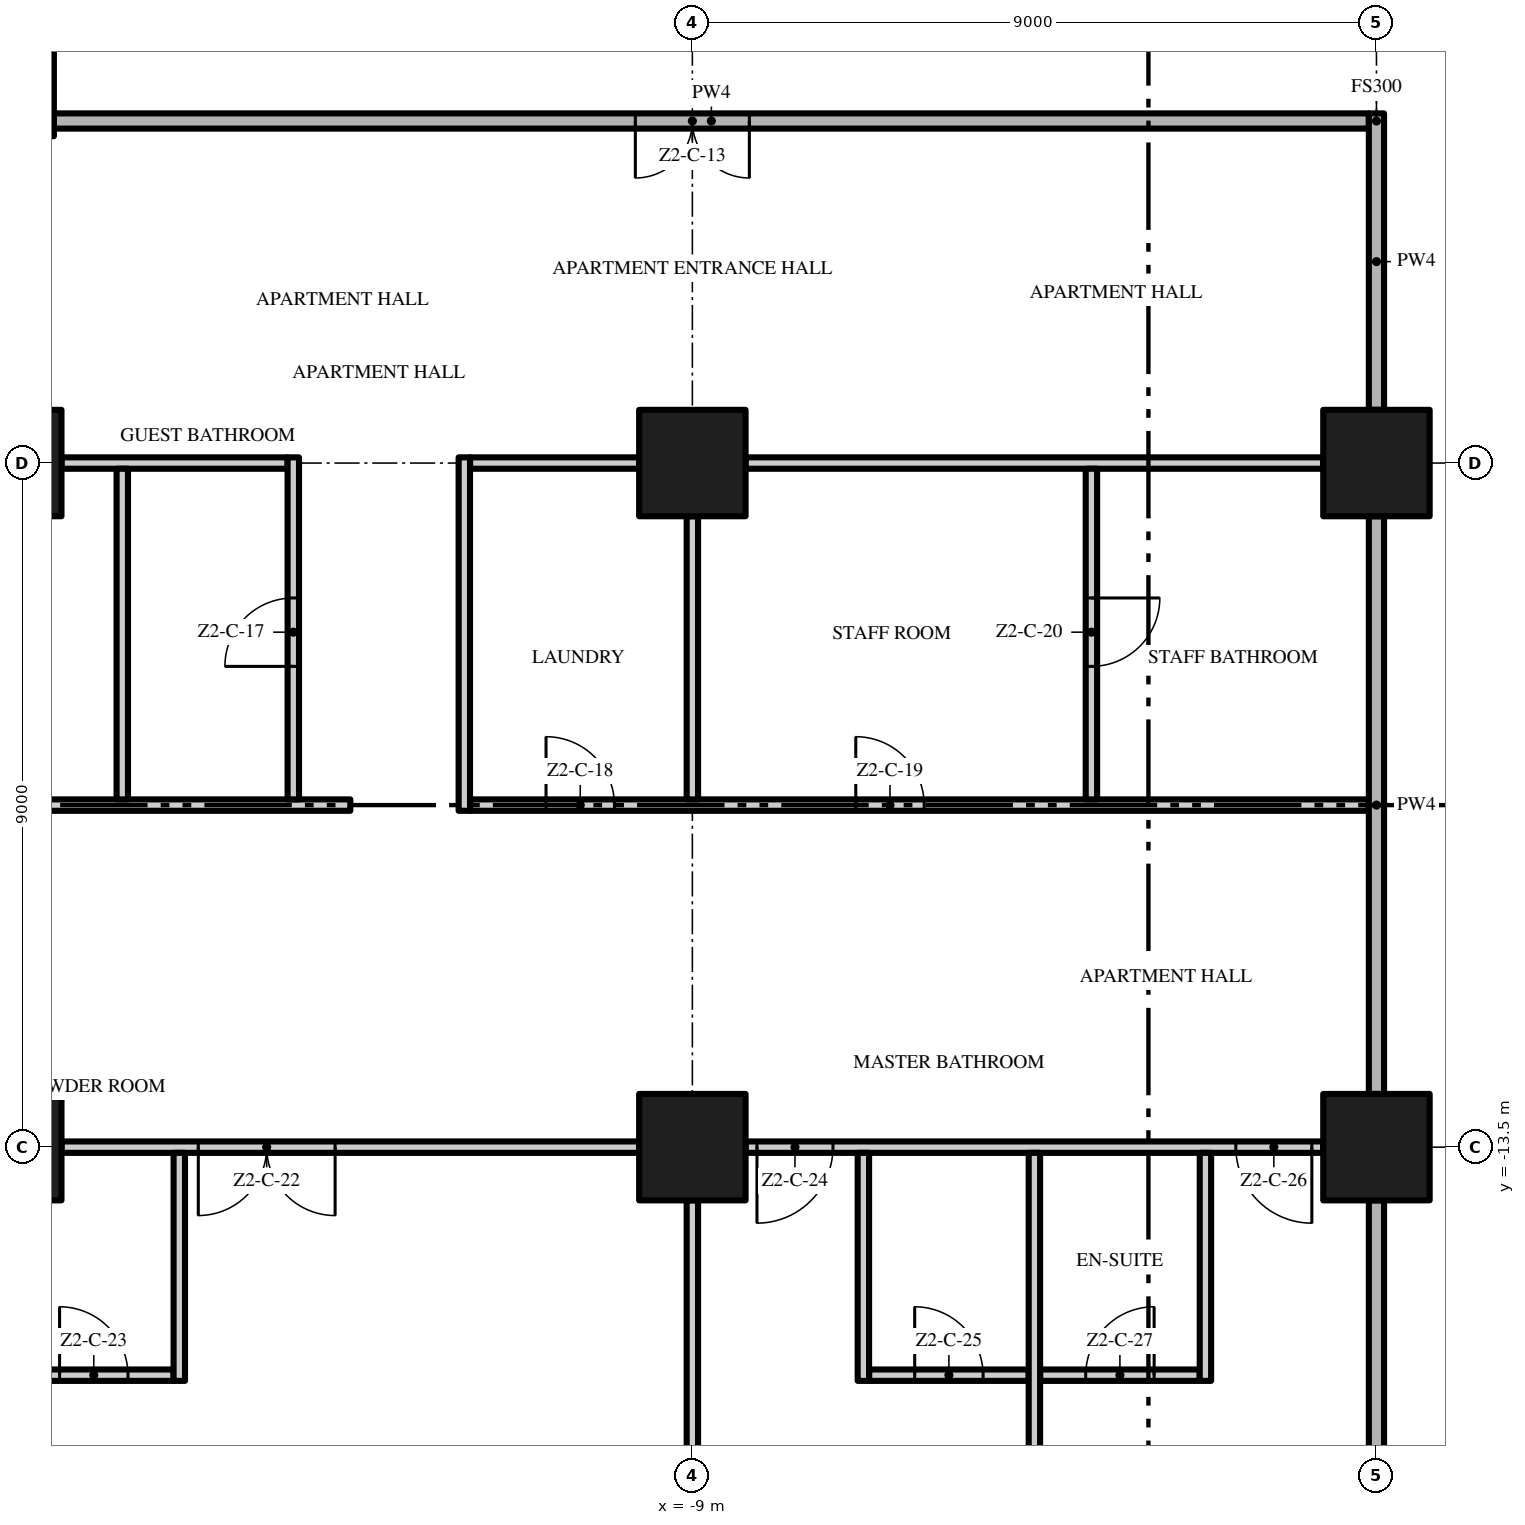
"""IFC4 building model, lengths in metres.
Left out: names, types, materials, properties, quantities, classifications, styles, units other than length and angle.
Written with IfcOpenShell. Run it as: python <this file> out.ifc"""

import sys

from ifc_helpers import new_model, si_unit, direction, frame, frame_2d, origin, origin_2d, place, context, subcontext, project, spatial, rectangle, extrude, element, fill, save


model = new_model("IFC4")
c1 = context("Model", 3, precision=1e-05, world=origin(), true_north=direction((0.0, 1.0)))
c2 = subcontext(c1, "Body", "Model", "MODEL_VIEW")
j1 = project(units=[si_unit("LENGTHUNIT", "METRE"), si_unit("PLANEANGLEUNIT", "RADIAN")], contexts=[c1])
p1 = place(None, origin())
s1 = spatial("IfcSite", under=j1, at=p1, CompositionType="ELEMENT")
p2 = place(p1, origin())
s2 = spatial("IfcBuilding", under=s1, at=p2, CompositionType="ELEMENT")
p3 = place(p2, frame((0.0, 0.0, 92.2)))
s3 = spatial("IfcBuildingStorey", under=s2, at=p3, CompositionType="ELEMENT", Elevation=92.2)
for number, where, z_axis, x_axis in (
    (1, (-18.0, -13.5, 0.0), (0.0, 0.0, 1.0), (1.0, 0.0, 0.0)),
    (2, (-18.0, -4.5, 0.0), (0.0, 0.0, 1.0), (1.0, 0.0, 0.0)),
    (3, (-9.0, -13.5, 0.0), (0.0, 0.0, 1.0), (1.0, 0.0, 0.0)),
    (4, (-9.0, -4.5, 0.0), (0.0, 0.0, 1.0), (1.0, 0.0, 0.0)),
    (5, (0.0, -13.5, 0.0), (0.0, 0.0, 1.0), (1.0, 0.0, 0.0)),
    (6, (0.0, -4.5, 0.0), (0.0, 0.0, 1.0), (1.0, 0.0, 0.0)),
):
    element("IfcColumn", number, at=place(p3, frame(where, z_axis=z_axis, x_axis=x_axis)), inside=s3, PredefinedType="COLUMN", context=c2, shape_type="SweptSolid", body=[
        extrude(rectangle(XDim=1.4, YDim=1.4, at=origin_2d()), origin(), (0.0, 0.0, 1.0), 3.5),
    ])
p4 = place(p3, frame((-17.925, -16.5, 0.0), z_axis=(0.0, 0.0, 1.0), x_axis=(1.0, 0.0, 0.0)))
e7 = element("IfcWall", 7, at=p4, inside=s3, PredefinedType="PARTITIONING", context=c2, shape_type="SweptSolid", body=[
    extrude(rectangle(XDim=2.1, YDim=0.15, at=frame_2d((1.05, 0.0))), origin(), (0.0, 0.0, 1.0), 3.5),
])
p5 = place(p4, frame((0.6, 0.0, 0.0)))
e8 = element("IfcOpeningElement", 8, at=p5, cuts=e7, PredefinedType="OPENING", context=c2, shape_type="SweptSolid", body=[
    extrude(rectangle(XDim=0.9, YDim=2.1, at=frame_2d((0.45, 1.05))), frame((0.0, 0.085, 0.0), z_axis=(0.0, -1.0, 0.0), x_axis=(1.0, 0.0, 0.0)), (0.0, 0.0, 1.0), 0.17),
])
p6 = place(p3, frame((-6.675, -16.5, 0.0), z_axis=(0.0, 0.0, 1.0), x_axis=(1.0, 0.0, 0.0)))
e9 = element("IfcWall", 9, at=p6, inside=s3, PredefinedType="PARTITIONING", context=c2, shape_type="SweptSolid", body=[
    extrude(rectangle(XDim=2.1, YDim=0.15, at=frame_2d((1.05, 0.0))), origin(), (0.0, 0.0, 1.0), 3.5),
])
p7 = place(p6, frame((0.6, 0.0, 0.0)))
e10 = element("IfcOpeningElement", 10, at=p7, cuts=e9, PredefinedType="OPENING", context=c2, shape_type="SweptSolid", body=[
    extrude(rectangle(XDim=0.9, YDim=2.1, at=frame_2d((0.45, 1.05))), frame((0.0, 0.085, 0.0), z_axis=(0.0, -1.0, 0.0), x_axis=(1.0, 0.0, 0.0)), (0.0, 0.0, 1.0), 0.17),
])
p8 = place(p3, frame((-4.425, -16.5, 0.0), z_axis=(0.0, 0.0, 1.0), x_axis=(1.0, 0.0, 0.0)))
e11 = element("IfcWall", 11, at=p8, inside=s3, PredefinedType="PARTITIONING", context=c2, shape_type="SweptSolid", body=[
    extrude(rectangle(XDim=2.1, YDim=0.15, at=frame_2d((1.05, 0.0))), origin(), (0.0, 0.0, 1.0), 3.5),
])
p9 = place(p8, frame((0.6, 0.0, 0.0)))
e12 = element("IfcOpeningElement", 12, at=p9, cuts=e11, PredefinedType="OPENING", context=c2, shape_type="SweptSolid", body=[
    extrude(rectangle(XDim=0.9, YDim=2.1, at=frame_2d((0.45, 1.05))), frame((0.0, 0.085, 0.0), z_axis=(0.0, -1.0, 0.0), x_axis=(1.0, 0.0, 0.0)), (0.0, 0.0, 1.0), 0.17),
])
p10 = place(p3, frame((-9.7, -13.5, 0.0), z_axis=(0.0, 0.0, 1.0), x_axis=(-1.0, 0.0, 0.0)))
e13 = element("IfcWall", 13, at=p10, inside=s3, PredefinedType="PARTITIONING", context=c2, shape_type="SweptSolid", body=[
    extrude(rectangle(XDim=7.6, YDim=0.15, at=frame_2d((3.8, 0.0))), origin(), (0.0, 0.0, 1.0), 3.5),
])
p11 = place(p10, frame((4.0, 0.0, 0.0)))
e14 = element("IfcOpeningElement", 14, at=p11, cuts=e13, PredefinedType="OPENING", context=c2, shape_type="SweptSolid", body=[
    extrude(rectangle(XDim=1.8, YDim=2.4, at=frame_2d((0.9, 1.2))), frame((0.0, 0.085, 0.0), z_axis=(0.0, -1.0, 0.0), x_axis=(1.0, 0.0, 0.0)), (0.0, 0.0, 1.0), 0.17),
])
p12 = place(p3, frame((-0.7, -13.5, 0.0), z_axis=(0.0, 0.0, 1.0), x_axis=(-1.0, 0.0, 0.0)))
e15 = element("IfcWall", 15, at=p12, inside=s3, PredefinedType="PARTITIONING", context=c2, shape_type="SweptSolid", body=[
    extrude(rectangle(XDim=7.6, YDim=0.15, at=frame_2d((3.8, 0.0))), origin(), (0.0, 0.0, 1.0), 3.5),
])
p13 = place(p12, frame((6.45, 0.0, 0.0)))
e16 = element("IfcOpeningElement", 16, at=p13, cuts=e15, PredefinedType="OPENING", context=c2, shape_type="SweptSolid", body=[
    extrude(rectangle(XDim=1.0, YDim=2.4, at=frame_2d((0.5, 1.2))), frame((0.0, 0.085, 0.0), z_axis=(0.0, -1.0, 0.0), x_axis=(1.0, 0.0, 0.0)), (0.0, 0.0, 1.0), 0.17),
])
p14 = place(p12, frame((0.15, 0.0, 0.0)))
e17 = element("IfcOpeningElement", 17, at=p14, cuts=e15, PredefinedType="OPENING", context=c2, shape_type="SweptSolid", body=[
    extrude(rectangle(XDim=1.0, YDim=2.4, at=frame_2d((0.5, 1.2))), frame((0.0, 0.085, 0.0), z_axis=(0.0, -1.0, 0.0), x_axis=(1.0, 0.0, 0.0)), (0.0, 0.0, 1.0), 0.17),
])
p15 = place(p3, frame((-26.7, -9.0, 0.0), z_axis=(0.0, 0.0, 1.0), x_axis=(1.0, 0.0, 0.0)))
e18 = element("IfcWall", 18, at=p15, inside=s3, PredefinedType="PARTITIONING", context=c2, shape_type="SweptSolid", body=[
    extrude(rectangle(XDim=13.2, YDim=0.15, at=frame_2d((6.6, 0.0))), origin(), (0.0, 0.0, 1.0), 3.5),
])
p16 = place(p15, frame((0.2, 0.0, 0.0)))
e19 = element("IfcOpeningElement", 19, at=p16, cuts=e18, PredefinedType="OPENING", context=c2, shape_type="SweptSolid", body=[
    extrude(rectangle(XDim=0.8, YDim=2.0, at=frame_2d((0.4, 1.0))), frame((0.0, 0.085, 0.0), z_axis=(0.0, -1.0, 0.0), x_axis=(1.0, 0.0, 0.0)), (0.0, 0.0, 1.0), 0.17),
])
p17 = place(p3, frame((-11.925, -9.0, 0.0), z_axis=(0.0, 0.0, 1.0), x_axis=(1.0, 0.0, 0.0)))
e20 = element("IfcWall", 20, at=p17, inside=s3, PredefinedType="PARTITIONING", context=c2, shape_type="SweptSolid", body=[
    extrude(rectangle(XDim=11.825, YDim=0.15, at=frame_2d((5.912, 0.0))), origin(), (0.0, 0.0, 1.0), 3.5),
])
p18 = place(p17, frame((1.0, 0.0, 0.0)))
e21 = element("IfcOpeningElement", 21, at=p18, cuts=e20, PredefinedType="OPENING", context=c2, shape_type="SweptSolid", body=[
    extrude(rectangle(XDim=0.9, YDim=2.1, at=frame_2d((0.45, 1.05))), frame((0.0, 0.085, 0.0), z_axis=(0.0, -1.0, 0.0), x_axis=(1.0, 0.0, 0.0)), (0.0, 0.0, 1.0), 0.17),
])
p19 = place(p17, frame((5.075, 0.0, 0.0)))
e22 = element("IfcOpeningElement", 22, at=p19, cuts=e20, PredefinedType="OPENING", context=c2, shape_type="SweptSolid", body=[
    extrude(rectangle(XDim=0.9, YDim=2.1, at=frame_2d((0.45, 1.05))), frame((0.0, 0.085, 0.0), z_axis=(0.0, -1.0, 0.0), x_axis=(1.0, 0.0, 0.0)), (0.0, 0.0, 1.0), 0.17),
])
p20 = place(p3, frame((-17.3, -4.5, 0.0), z_axis=(0.0, 0.0, 1.0), x_axis=(1.0, 0.0, 0.0)))
e23 = element("IfcWall", 23, at=p20, inside=s3, PredefinedType="PARTITIONING", context=c2, shape_type="SweptSolid", body=[
    extrude(rectangle(XDim=2.975, YDim=0.15, at=frame_2d((1.488, 0.0))), origin(), (0.0, 0.0, 1.0), 3.5),
])
p21 = place(p3, frame((-11.925, -4.5, 0.0), z_axis=(0.0, 0.0, 1.0), x_axis=(1.0, 0.0, 0.0)))
e24 = element("IfcWall", 24, at=p21, inside=s3, PredefinedType="PARTITIONING", context=c2, shape_type="SweptSolid", body=[
    extrude(rectangle(XDim=2.225, YDim=0.15, at=frame_2d((1.113, 0.0))), origin(), (0.0, 0.0, 1.0), 3.5),
])
p22 = place(p3, frame((-8.3, -4.5, 0.0), z_axis=(0.0, 0.0, 1.0), x_axis=(1.0, 0.0, 0.0)))
e25 = element("IfcWall", 25, at=p22, inside=s3, PredefinedType="PARTITIONING", context=c2, shape_type="SweptSolid", body=[
    extrude(rectangle(XDim=7.6, YDim=0.15, at=frame_2d((3.8, 0.0))), origin(), (0.0, 0.0, 1.0), 3.5),
])
p23 = place(p3, frame((-0.1, 0.0, 0.0), z_axis=(0.0, 0.0, 1.0), x_axis=(-1.0, 0.0, 0.0)))
e26 = element("IfcWall", 26, at=p23, inside=s3, PredefinedType="PARTITIONING", context=c2, shape_type="SweptSolid", body=[
    extrude(rectangle(XDim=17.3, YDim=0.2, at=frame_2d((8.65, 0.0))), origin(), (0.0, 0.0, 1.0), 3.5),
])
p24 = place(p23, frame((8.15, 0.0, 0.0)))
e27 = element("IfcOpeningElement", 27, at=p24, cuts=e26, PredefinedType="OPENING", context=c2, shape_type="SweptSolid", body=[
    extrude(rectangle(XDim=1.5, YDim=2.4, at=frame_2d((0.75, 1.2))), frame((0.0, 0.11, 0.0), z_axis=(0.0, -1.0, 0.0), x_axis=(1.0, 0.0, 0.0)), (0.0, 0.0, 1.0), 0.22),
])
p25 = place(p3, frame((-17.5, -0.2, 0.0), z_axis=(0.0, 0.0, 1.0), x_axis=(0.0, 1.0, 0.0)))
e28 = element("IfcWall", 28, at=p25, inside=s3, PredefinedType="PARTITIONING", context=c2, shape_type="SweptSolid", body=[
    extrude(rectangle(XDim=4.0, YDim=0.2, at=frame_2d((2.0, 0.0))), origin(), (0.0, 0.0, 1.0), 3.5),
])
p26 = place(p3, frame((-16.5, -8.925, 0.0), z_axis=(0.0, 0.0, 1.0), x_axis=(0.0, 1.0, 0.0)))
e29 = element("IfcWall", 29, at=p26, inside=s3, PredefinedType="PARTITIONING", context=c2, shape_type="SweptSolid", body=[
    extrude(rectangle(XDim=4.35, YDim=0.15, at=frame_2d((2.175, 0.0))), origin(), (0.0, 0.0, 1.0), 3.5),
])
p27 = place(p3, frame((-15.75, -16.575, 0.0), z_axis=(0.0, 0.0, 1.0), x_axis=(0.0, 1.0, 0.0)))
e30 = element("IfcWall", 30, at=p27, inside=s3, PredefinedType="PARTITIONING", context=c2, shape_type="SweptSolid", body=[
    extrude(rectangle(XDim=3.0, YDim=0.15, at=frame_2d((1.5, 0.0))), origin(), (0.0, 0.0, 1.0), 3.5),
])
p28 = place(p3, frame((-14.25, -8.925, 0.0), z_axis=(0.0, 0.0, 1.0), x_axis=(0.0, 1.0, 0.0)))
e31 = element("IfcWall", 31, at=p28, inside=s3, PredefinedType="PARTITIONING", context=c2, shape_type="SweptSolid", body=[
    extrude(rectangle(XDim=4.5, YDim=0.15, at=frame_2d((2.25, 0.0))), origin(), (0.0, 0.0, 1.0), 3.5),
])
p29 = place(p28, frame((1.75, 0.0, 0.0)))
e32 = element("IfcOpeningElement", 32, at=p29, cuts=e31, PredefinedType="OPENING", context=c2, shape_type="SweptSolid", body=[
    extrude(rectangle(XDim=0.9, YDim=2.1, at=frame_2d((0.45, 1.05))), frame((0.0, 0.085, 0.0), z_axis=(0.0, -1.0, 0.0), x_axis=(1.0, 0.0, 0.0)), (0.0, 0.0, 1.0), 0.17),
])
p30 = place(p3, frame((-12.0, -9.075, 0.0), z_axis=(0.0, 0.0, 1.0), x_axis=(0.0, 1.0, 0.0)))
e33 = element("IfcWall", 33, at=p30, inside=s3, PredefinedType="PARTITIONING", context=c2, shape_type="SweptSolid", body=[
    extrude(rectangle(XDim=4.65, YDim=0.15, at=frame_2d((2.325, 0.0))), origin(), (0.0, 0.0, 1.0), 3.5),
])
p31 = place(p3, frame((-9.0, -21.2, 0.0), z_axis=(0.0, 0.0, 1.0), x_axis=(0.0, 1.0, 0.0)))
e34 = element("IfcWall", 34, at=p31, inside=s3, PredefinedType="PARTITIONING", context=c2, shape_type="SweptSolid", body=[
    extrude(rectangle(XDim=7.0, YDim=0.15, at=frame_2d((3.5, 0.0))), origin(), (0.0, 0.0, 1.0), 3.5),
])
p32 = place(p3, frame((-9.0, -8.925, 0.0), z_axis=(0.0, 0.0, 1.0), x_axis=(0.0, 1.0, 0.0)))
e35 = element("IfcWall", 35, at=p32, inside=s3, PredefinedType="PARTITIONING", context=c2, shape_type="SweptSolid", body=[
    extrude(rectangle(XDim=3.725, YDim=0.15, at=frame_2d((1.863, 0.0))), origin(), (0.0, 0.0, 1.0), 3.5),
])
p33 = place(p3, frame((-6.75, -16.575, 0.0), z_axis=(0.0, 0.0, 1.0), x_axis=(0.0, 1.0, 0.0)))
e36 = element("IfcWall", 36, at=p33, inside=s3, PredefinedType="PARTITIONING", context=c2, shape_type="SweptSolid", body=[
    extrude(rectangle(XDim=3.0, YDim=0.15, at=frame_2d((1.5, 0.0))), origin(), (0.0, 0.0, 1.0), 3.5),
])
p34 = place(p3, frame((-4.5, -22.2, 0.0), z_axis=(0.0, 0.0, 1.0), x_axis=(0.0, 1.0, 0.0)))
e37 = element("IfcWall", 37, at=p34, inside=s3, PredefinedType="PARTITIONING", context=c2, shape_type="SweptSolid", body=[
    extrude(rectangle(XDim=8.625, YDim=0.15, at=frame_2d((4.312, 0.0))), origin(), (0.0, 0.0, 1.0), 3.5),
])
p35 = place(p3, frame((-3.75, -4.575, 0.0), z_axis=(0.0, 0.0, 1.0), x_axis=(0.0, -1.0, 0.0)))
e38 = element("IfcWall", 38, at=p35, inside=s3, PredefinedType="PARTITIONING", context=c2, shape_type="SweptSolid", body=[
    extrude(rectangle(XDim=4.35, YDim=0.15, at=frame_2d((2.175, 0.0))), origin(), (0.0, 0.0, 1.0), 3.5),
])
p36 = place(p35, frame((1.7, 0.0, 0.0)))
e39 = element("IfcOpeningElement", 39, at=p36, cuts=e38, PredefinedType="OPENING", context=c2, shape_type="SweptSolid", body=[
    extrude(rectangle(XDim=0.9, YDim=2.1, at=frame_2d((0.45, 1.05))), frame((0.0, 0.085, 0.0), z_axis=(0.0, -1.0, 0.0), x_axis=(1.0, 0.0, 0.0)), (0.0, 0.0, 1.0), 0.17),
])
p37 = place(p3, frame((-2.25, -16.575, 0.0), z_axis=(0.0, 0.0, 1.0), x_axis=(0.0, 1.0, 0.0)))
e40 = element("IfcWall", 40, at=p37, inside=s3, PredefinedType="PARTITIONING", context=c2, shape_type="SweptSolid", body=[
    extrude(rectangle(XDim=3.0, YDim=0.15, at=frame_2d((1.5, 0.0))), origin(), (0.0, 0.0, 1.0), 3.5),
])
p38 = place(p3, frame((0.0, -21.2, 0.0), z_axis=(0.0, 0.0, 1.0), x_axis=(0.0, 1.0, 0.0)))
e41 = element("IfcWall", 41, at=p38, inside=s3, PredefinedType="PARTITIONING", context=c2, shape_type="SweptSolid", body=[
    extrude(rectangle(XDim=7.0, YDim=0.2, at=frame_2d((3.5, 0.0))), origin(), (0.0, 0.0, 1.0), 3.5),
])
p39 = place(p3, frame((0.0, -12.8, 0.0), z_axis=(0.0, 0.0, 1.0), x_axis=(0.0, 1.0, 0.0)))
e42 = element("IfcWall", 42, at=p39, inside=s3, PredefinedType="PARTITIONING", context=c2, shape_type="SweptSolid", body=[
    extrude(rectangle(XDim=7.6, YDim=0.2, at=frame_2d((3.8, 0.0))), origin(), (0.0, 0.0, 1.0), 3.5),
])
p40 = place(p3, frame((0.0, -3.8, 0.0), z_axis=(0.0, 0.0, 1.0), x_axis=(0.0, 1.0, 0.0)))
e43 = element("IfcWall", 43, at=p40, inside=s3, PredefinedType="PARTITIONING", context=c2, shape_type="SweptSolid", body=[
    extrude(rectangle(XDim=3.9, YDim=0.2, at=frame_2d((1.95, 0.0))), origin(), (0.0, 0.0, 1.0), 3.5),
])
p41 = place(p24, origin())
e44 = element("IfcDoor", 44, at=p41, inside=s3, OperationType="DOUBLE_DOOR_SINGLE_SWING", PredefinedType="DOOR", context=c2, shape_type="SweptSolid", body=[
    extrude(rectangle(XDim=1.5, YDim=2.4, at=frame_2d((0.75, 1.2))), frame((0.0, 0.025, 0.0), z_axis=(0.0, -1.0, 0.0), x_axis=(1.0, 0.0, 0.0)), (0.0, 0.0, 1.0), 0.05),
])
fill(e27, e44)
p42 = place(p29, origin())
e45 = element("IfcDoor", 45, at=p42, inside=s3, OperationType="SINGLE_SWING_LEFT", PredefinedType="DOOR", context=c2, shape_type="SweptSolid", body=[
    extrude(rectangle(XDim=0.9, YDim=2.1, at=frame_2d((0.45, 1.05))), frame((0.0, 0.025, 0.0), z_axis=(0.0, -1.0, 0.0), x_axis=(1.0, 0.0, 0.0)), (0.0, 0.0, 1.0), 0.05),
])
fill(e32, e45)
p43 = place(p18, origin())
e46 = element("IfcDoor", 46, at=p43, inside=s3, OperationType="SINGLE_SWING_LEFT", PredefinedType="DOOR", context=c2, shape_type="SweptSolid", body=[
    extrude(rectangle(XDim=0.9, YDim=2.1, at=frame_2d((0.45, 1.05))), frame((0.0, 0.025, 0.0), z_axis=(0.0, -1.0, 0.0), x_axis=(1.0, 0.0, 0.0)), (0.0, 0.0, 1.0), 0.05),
])
fill(e21, e46)
p44 = place(p19, origin())
e47 = element("IfcDoor", 47, at=p44, inside=s3, OperationType="SINGLE_SWING_LEFT", PredefinedType="DOOR", context=c2, shape_type="SweptSolid", body=[
    extrude(rectangle(XDim=0.9, YDim=2.1, at=frame_2d((0.45, 1.05))), frame((0.0, 0.025, 0.0), z_axis=(0.0, -1.0, 0.0), x_axis=(1.0, 0.0, 0.0)), (0.0, 0.0, 1.0), 0.05),
])
fill(e22, e47)
p45 = place(p36, origin())
e48 = element("IfcDoor", 48, at=p45, inside=s3, OperationType="SINGLE_SWING_LEFT", PredefinedType="DOOR", context=c2, shape_type="SweptSolid", body=[
    extrude(rectangle(XDim=0.9, YDim=2.1, at=frame_2d((0.45, 1.05))), frame((0.0, 0.025, 0.0), z_axis=(0.0, -1.0, 0.0), x_axis=(1.0, 0.0, 0.0)), (0.0, 0.0, 1.0), 0.05),
])
fill(e39, e48)
p46 = place(p11, origin())
e49 = element("IfcDoor", 49, at=p46, inside=s3, OperationType="DOUBLE_DOOR_SINGLE_SWING", PredefinedType="DOOR", context=c2, shape_type="SweptSolid", body=[
    extrude(rectangle(XDim=1.8, YDim=2.4, at=frame_2d((0.9, 1.2))), frame((0.0, 0.025, 0.0), z_axis=(0.0, -1.0, 0.0), x_axis=(1.0, 0.0, 0.0)), (0.0, 0.0, 1.0), 0.05),
])
fill(e14, e49)
p47 = place(p5, origin())
e50 = element("IfcDoor", 50, at=p47, inside=s3, OperationType="SINGLE_SWING_LEFT", PredefinedType="DOOR", context=c2, shape_type="SweptSolid", body=[
    extrude(rectangle(XDim=0.9, YDim=2.1, at=frame_2d((0.45, 1.05))), frame((0.0, 0.025, 0.0), z_axis=(0.0, -1.0, 0.0), x_axis=(1.0, 0.0, 0.0)), (0.0, 0.0, 1.0), 0.05),
])
fill(e8, e50)
p48 = place(p13, origin())
e51 = element("IfcDoor", 51, at=p48, inside=s3, OperationType="SINGLE_SWING_RIGHT", PredefinedType="DOOR", context=c2, shape_type="SweptSolid", body=[
    extrude(rectangle(XDim=1.0, YDim=2.4, at=frame_2d((0.5, 1.2))), frame((0.0, 0.025, 0.0), z_axis=(0.0, -1.0, 0.0), x_axis=(1.0, 0.0, 0.0)), (0.0, 0.0, 1.0), 0.05),
])
fill(e16, e51)
p49 = place(p7, origin())
e52 = element("IfcDoor", 52, at=p49, inside=s3, OperationType="SINGLE_SWING_LEFT", PredefinedType="DOOR", context=c2, shape_type="SweptSolid", body=[
    extrude(rectangle(XDim=0.9, YDim=2.1, at=frame_2d((0.45, 1.05))), frame((0.0, 0.025, 0.0), z_axis=(0.0, -1.0, 0.0), x_axis=(1.0, 0.0, 0.0)), (0.0, 0.0, 1.0), 0.05),
])
fill(e10, e52)
p50 = place(p14, origin())
e53 = element("IfcDoor", 53, at=p50, inside=s3, OperationType="SINGLE_SWING_LEFT", PredefinedType="DOOR", context=c2, shape_type="SweptSolid", body=[
    extrude(rectangle(XDim=1.0, YDim=2.4, at=frame_2d((0.5, 1.2))), frame((0.0, 0.025, 0.0), z_axis=(0.0, -1.0, 0.0), x_axis=(1.0, 0.0, 0.0)), (0.0, 0.0, 1.0), 0.05),
])
fill(e17, e53)
p51 = place(p9, origin())
e54 = element("IfcDoor", 54, at=p51, inside=s3, OperationType="SINGLE_SWING_RIGHT", PredefinedType="DOOR", context=c2, shape_type="SweptSolid", body=[
    extrude(rectangle(XDim=0.9, YDim=2.1, at=frame_2d((0.45, 1.05))), frame((0.0, 0.025, 0.0), z_axis=(0.0, -1.0, 0.0), x_axis=(1.0, 0.0, 0.0)), (0.0, 0.0, 1.0), 0.05),
])
fill(e12, e54)
save(model, sys.argv[1])
